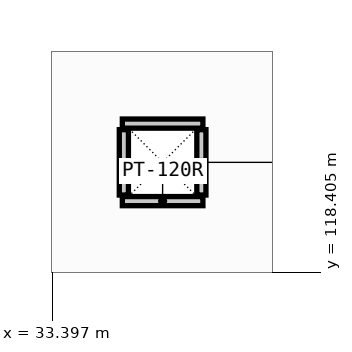
"""IFC4 building model, lengths in metres.
Left out: names, types, materials, properties, quantities, classifications, styles, units other than length and angle.
Written with IfcOpenShell. Run it as: python <this file> out.ifc"""

import sys

from ifc_helpers import new_model, si_unit, direction, frame, frame_2d, origin, place, context, subcontext, project, spatial, rectangle, extrude, element, save


model = new_model("IFC4")
c1 = context("Model", 3, precision=1e-05, world=origin(), true_north=direction((0.0, 1.0)))
c2 = subcontext(c1, "Body", "Model", "MODEL_VIEW")
j1 = project(units=[si_unit("LENGTHUNIT", "METRE"), si_unit("PLANEANGLEUNIT", "RADIAN")], contexts=[c1])
p1 = place(None, origin())
s1 = spatial("IfcSite", under=j1, at=p1, CompositionType="ELEMENT")
p2 = place(p1, origin())
s2 = spatial("IfcBuilding", under=s1, at=p2, CompositionType="ELEMENT")
p3 = place(p2, frame((0.0, 0.0, 9.0)))
s3 = spatial("IfcBuildingStorey", under=s2, at=p3, CompositionType="ELEMENT", Elevation=9.0)
for number, where, z_axis, x_axis in (
    (1, (34.32, 119.34, 0.0), (0.0, 0.0, 1.0), (1.0, 0.0, 0.0)),
    (2, (34.32, 120.36, 0.0), (0.0, 0.0, 1.0), (1.0, 0.0, 0.0)),
):
    element("IfcWall", number, at=place(p3, frame(where, z_axis=z_axis, x_axis=x_axis)), inside=s3, PredefinedType="PARTITIONING", context=c2, shape_type="SweptSolid", body=[
        extrude(rectangle(XDim=1.06, YDim=0.12, at=frame_2d((0.53, 0.0))), origin(), (0.0, 0.0, 1.0), 2.95),
    ])
for number, where, z_axis, x_axis in (
    (3, (34.34, 119.42, 0.0), (0.0, 0.0, 1.0), (0.0, 1.0, 0.0)),
    (4, (35.36, 119.42, 0.0), (0.0, 0.0, 1.0), (0.0, 1.0, 0.0)),
):
    element("IfcWall", number, at=place(p3, frame(where, z_axis=z_axis, x_axis=x_axis)), inside=s3, PredefinedType="PARTITIONING", context=c2, shape_type="SweptSolid", body=[
        extrude(rectangle(XDim=0.86, YDim=0.12, at=frame_2d((0.43, 0.0))), origin(), (0.0, 0.0, 1.0), 2.95),
    ])
save(model, sys.argv[1])
